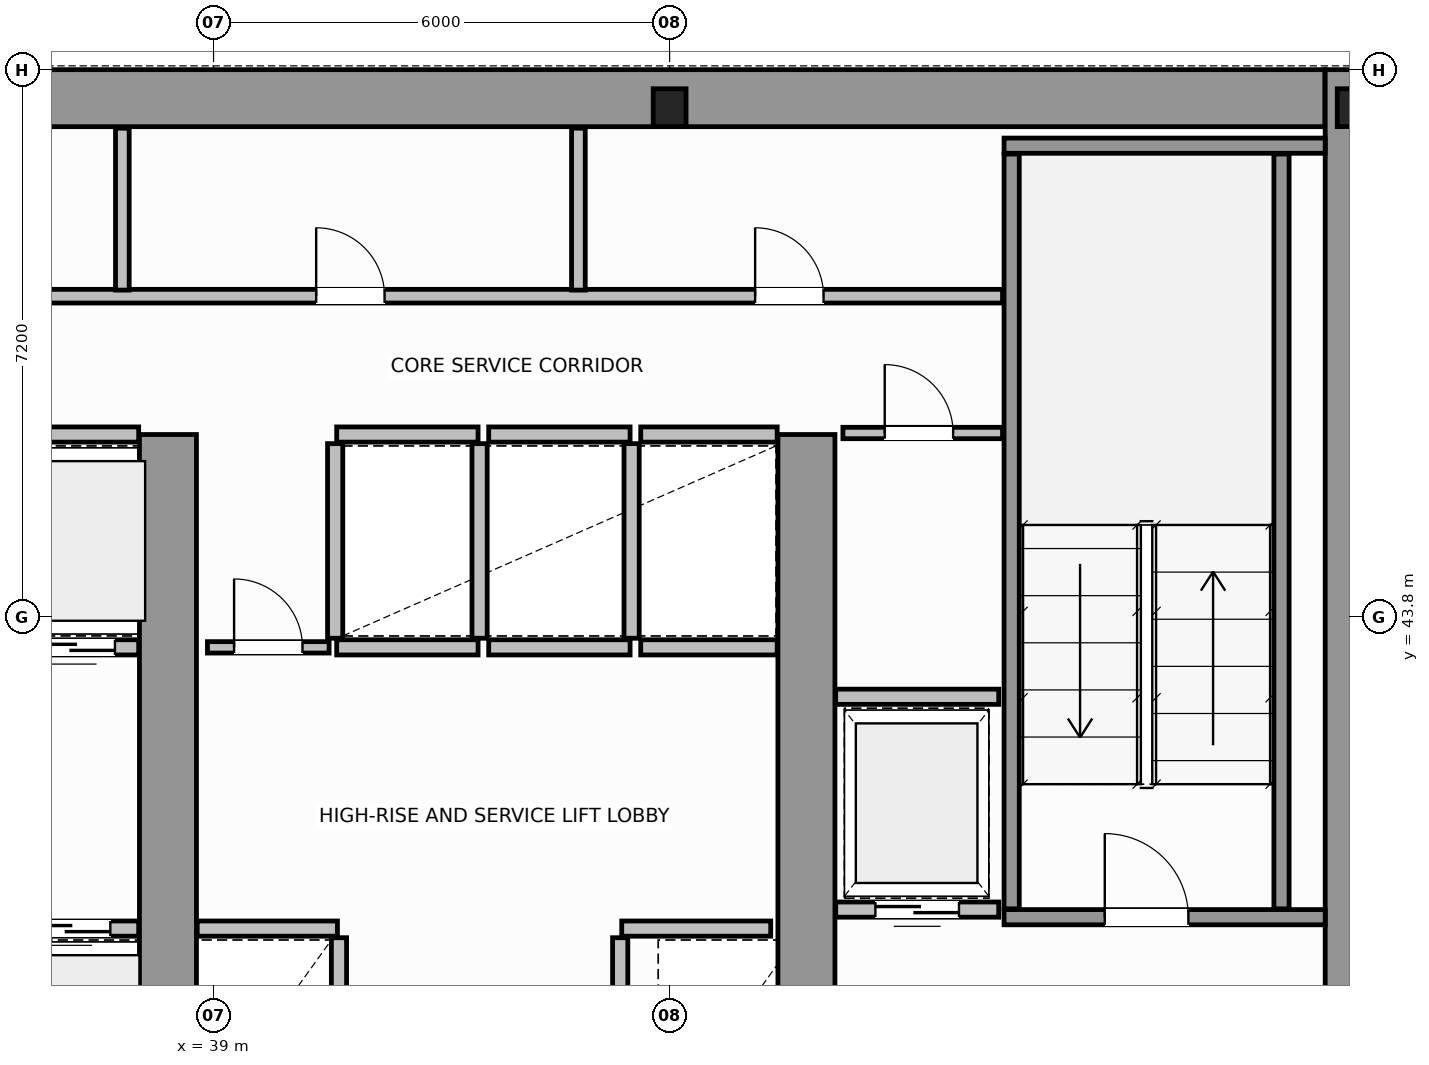
"""IFC4 building model, lengths in metres.
Left out: names, types, materials, properties, quantities, classifications, styles, units other than length and angle.
Written with IfcOpenShell. Run it as: python <this file> out.ifc"""

import sys

from ifc_helpers import new_model, si_unit, direction, frame, frame_2d, origin, origin_2d, place, context, subcontext, project, spatial, rectangle, i_section, extrude, source, transform, mapped, element, fill, save


model = new_model("IFC4")
c1 = context("Model", 3, precision=1e-05, world=origin(), true_north=direction((0.0, 1.0)))
c2 = subcontext(c1, "Body", "Model", "MODEL_VIEW")
j1 = project(units=[si_unit("LENGTHUNIT", "METRE"), si_unit("PLANEANGLEUNIT", "RADIAN")], contexts=[c1])
p1 = place(None, origin())
s1 = spatial("IfcSite", under=j1, at=p1, CompositionType="ELEMENT")
p2 = place(p1, origin())
s2 = spatial("IfcBuilding", under=s1, at=p2, CompositionType="ELEMENT")
p3 = place(p2, frame((0.0, 0.0, 157.6)))
s3 = spatial("IfcBuildingStorey", under=s2, at=p3, CompositionType="ELEMENT", Elevation=157.6)
m1 = source(origin(), c2, "Body", "SweptSolid", [
    extrude(i_section(OverallWidth=0.432, OverallDepth=0.498, WebThickness=0.055, FlangeThickness=0.068, FilletRadius=0.015, at=origin_2d()), origin(), (0.0, 0.0, 1.0), 3.8),
])
for number, where, z_axis, x_axis in (
    (1, (45.0, 50.5, 0.0), (0.0, 0.0, 1.0), (1.0, 0.0, 0.0)),
    (2, (54.0, 50.5, 0.0), (0.0, 0.0, 1.0), (1.0, 0.0, 0.0)),
):
    element("IfcColumn", number, at=place(p3, frame(where, z_axis=z_axis, x_axis=x_axis)), inside=s3, PredefinedType="COLUMN", context=c2, shape_type="MappedRepresentation", body=[
        mapped(m1, transform((0.0, 0.0, 0.0), scale=1.0)),
    ])
p4 = place(p3, frame((34.002, 50.625, 0.0), z_axis=(0.0, 0.0, 1.0), x_axis=(1.0, 0.0, 0.0)))
e3 = element("IfcWall", 3, at=p4, inside=s3, PredefinedType="SHEAR", context=c2, shape_type="SweptSolid", body=[
    extrude(rectangle(XDim=19.619, YDim=0.75, at=frame_2d((9.81, 0.0))), origin(), (0.0, 0.0, 1.0), 3.8),
])
p5 = place(p3, frame((54.0, 36.5, 0.0), z_axis=(0.0, 0.0, 1.0), x_axis=(0.0, 1.0, 0.0)))
e4 = element("IfcWall", 4, at=p5, inside=s3, PredefinedType="SHEAR", context=c2, shape_type="SweptSolid", body=[
    extrude(rectangle(XDim=14.5, YDim=0.75, at=frame_2d((7.25, 0.0))), origin(), (0.0, 0.0, 1.0), 3.8),
])
for number, where, z_axis, x_axis in (
    (5, (38.4, 36.895, 0.0), (0.0, 0.0, 1.0), (0.0, 1.0, 0.0)),
    (6, (46.8, 36.895, 0.0), (0.0, 0.0, 1.0), (0.0, 1.0, 0.0)),
):
    element("IfcWall", number, at=place(p3, frame(where, z_axis=z_axis, x_axis=x_axis)), inside=s3, PredefinedType="SHEAR", context=c2, shape_type="SweptSolid", body=[
        extrude(rectangle(XDim=9.305, YDim=0.75, at=frame_2d((4.652, 0.0))), origin(), (0.0, 0.0, 1.0), 3.8),
    ])
p6 = place(p3, frame((49.4, 39.85, 0.0), z_axis=(0.0, 0.0, 1.0), x_axis=(1.0, 0.0, 0.0)))
e7 = element("IfcWall", 7, at=p6, inside=s3, PredefinedType="SOLIDWALL", context=c2, shape_type="SweptSolid", body=[
    extrude(rectangle(XDim=4.225, YDim=0.2, at=frame_2d((2.113, 0.0))), origin(), (0.0, 0.0, 1.0), 3.8),
])
p7 = place(p6, frame((1.325, 0.0, 0.0)))
e8 = element("IfcOpeningElement", 8, at=p7, cuts=e7, PredefinedType="OPENING", context=c2, shape_type="SweptSolid", body=[
    extrude(rectangle(XDim=1.1, YDim=2.15, at=frame_2d((0.55, 1.075))), frame((0.0, 0.11, 0.0), z_axis=(0.0, -1.0, 0.0), x_axis=(1.0, 0.0, 0.0)), (0.0, 0.0, 1.0), 0.22),
])
p8 = place(p3, frame((49.4, 50.0, 0.0), z_axis=(0.0, 0.0, 1.0), x_axis=(1.0, 0.0, 0.0)))
e9 = element("IfcWall", 9, at=p8, inside=s3, PredefinedType="SOLIDWALL", context=c2, shape_type="SweptSolid", body=[
    extrude(rectangle(XDim=4.225, YDim=0.2, at=frame_2d((2.113, 0.0))), origin(), (0.0, 0.0, 1.0), 3.8),
])
for number, where, z_axis, x_axis in (
    (10, (49.5, 39.96, 0.0), (0.0, 0.0, 1.0), (0.0, 1.0, 0.0)),
    (11, (53.05, 39.96, 0.0), (0.0, 0.0, 1.0), (0.0, 1.0, 0.0)),
):
    element("IfcWall", number, at=place(p3, frame(where, z_axis=z_axis, x_axis=x_axis)), inside=s3, PredefinedType="SOLIDWALL", context=c2, shape_type="SweptSolid", body=[
        extrude(rectangle(XDim=9.93, YDim=0.2, at=frame_2d((4.965, 0.0))), origin(), (0.0, 0.0, 1.0), 3.8),
    ])
p9 = place(p3, frame((36.17, 39.7, 0.0), z_axis=(0.0, 0.0, 1.0), x_axis=(1.0, 0.0, 0.0)))
e12 = element("IfcWall", 12, at=p9, inside=s3, PredefinedType="SOLIDWALL", context=c2, shape_type="SweptSolid", body=[
    extrude(rectangle(XDim=1.845, YDim=0.2, at=frame_2d((0.922, 0.0))), origin(), (0.0, 0.0, 1.0), 3.58),
])
p10 = place(p9, frame((0.372, 0.0, 0.0)))
e13 = element("IfcOpeningElement", 13, at=p10, cuts=e12, PredefinedType="OPENING", context=c2, shape_type="SweptSolid", body=[
    extrude(rectangle(XDim=1.1, YDim=2.15, at=frame_2d((0.55, 1.075))), frame((0.0, 0.11, 0.0), z_axis=(0.0, -1.0, 0.0), x_axis=(1.0, 0.0, 0.0)), (0.0, 0.0, 1.0), 0.22),
])
p11 = place(p3, frame((36.29, 43.4, 0.0), z_axis=(0.0, 0.0, 1.0), x_axis=(1.0, 0.0, 0.0)))
e14 = element("IfcWall", 14, at=p11, inside=s3, PredefinedType="SOLIDWALL", context=c2, shape_type="SweptSolid", body=[
    extrude(rectangle(XDim=1.725, YDim=0.2, at=frame_2d((0.862, 0.0))), origin(), (0.0, 0.0, 1.0), 3.58),
])
p12 = place(p11, frame((0.313, 0.0, 0.0)))
e15 = element("IfcOpeningElement", 15, at=p12, cuts=e14, PredefinedType="OPENING", context=c2, shape_type="SweptSolid", body=[
    extrude(rectangle(XDim=1.1, YDim=2.15, at=frame_2d((0.55, 1.075))), frame((0.0, 0.11, 0.0), z_axis=(0.0, -1.0, 0.0), x_axis=(1.0, 0.0, 0.0)), (0.0, 0.0, 1.0), 0.22),
])
p13 = place(p3, frame((36.29, 46.2, 0.0), z_axis=(0.0, 0.0, 1.0), x_axis=(1.0, 0.0, 0.0)))
e16 = element("IfcWall", 16, at=p13, inside=s3, PredefinedType="SOLIDWALL", context=c2, shape_type="SweptSolid", body=[
    extrude(rectangle(XDim=1.725, YDim=0.2, at=frame_2d((0.862, 0.0))), origin(), (0.0, 0.0, 1.0), 3.58),
])
p14 = place(p3, frame((38.785, 39.7, 0.0), z_axis=(0.0, 0.0, 1.0), x_axis=(1.0, 0.0, 0.0)))
e17 = element("IfcWall", 17, at=p14, inside=s3, PredefinedType="SOLIDWALL", context=c2, shape_type="SweptSolid", body=[
    extrude(rectangle(XDim=1.845, YDim=0.2, at=frame_2d((0.922, 0.0))), origin(), (0.0, 0.0, 1.0), 3.58),
])
p15 = place(p3, frame((40.65, 37.02, 0.0), z_axis=(0.0, 0.0, 1.0), x_axis=(0.0, 1.0, 0.0)))
e18 = element("IfcWall", 18, at=p15, inside=s3, PredefinedType="SOLIDWALL", context=c2, shape_type="SweptSolid", body=[
    extrude(rectangle(XDim=2.56, YDim=0.2, at=frame_2d((1.28, 0.0))), origin(), (0.0, 0.0, 1.0), 3.58),
])
p16 = place(p3, frame((44.37, 39.7, 0.0), z_axis=(0.0, 0.0, 1.0), x_axis=(1.0, 0.0, 0.0)))
e19 = element("IfcWall", 19, at=p16, inside=s3, PredefinedType="SOLIDWALL", context=c2, shape_type="SweptSolid", body=[
    extrude(rectangle(XDim=1.96, YDim=0.2, at=frame_2d((0.98, 0.0))), origin(), (0.0, 0.0, 1.0), 3.58),
])
p17 = place(p3, frame((44.35, 37.02, 0.0), z_axis=(0.0, 0.0, 1.0), x_axis=(0.0, 1.0, 0.0)))
e20 = element("IfcWall", 20, at=p17, inside=s3, PredefinedType="SOLIDWALL", context=c2, shape_type="SweptSolid", body=[
    extrude(rectangle(XDim=2.56, YDim=0.2, at=frame_2d((1.28, 0.0))), origin(), (0.0, 0.0, 1.0), 3.58),
])
for number, where, z_axis, x_axis in (
    (21, (40.62, 43.4, 0.0), (0.0, 0.0, 1.0), (1.0, 0.0, 0.0)),
    (22, (40.62, 46.2, 0.0), (0.0, 0.0, 1.0), (1.0, 0.0, 0.0)),
):
    element("IfcWall", number, at=place(p3, frame(where, z_axis=z_axis, x_axis=x_axis)), inside=s3, PredefinedType="SOLIDWALL", context=c2, shape_type="SweptSolid", body=[
        extrude(rectangle(XDim=1.86, YDim=0.2, at=frame_2d((0.93, 0.0))), origin(), (0.0, 0.0, 1.0), 3.58),
    ])
for number, where, z_axis, x_axis in (
    (23, (40.6, 43.52, 0.0), (0.0, 0.0, 1.0), (0.0, 1.0, 0.0)),
    (24, (42.5, 43.52, 0.0), (0.0, 0.0, 1.0), (0.0, 1.0, 0.0)),
):
    element("IfcWall", number, at=place(p3, frame(where, z_axis=z_axis, x_axis=x_axis)), inside=s3, PredefinedType="SOLIDWALL", context=c2, shape_type="SweptSolid", body=[
        extrude(rectangle(XDim=2.56, YDim=0.2, at=frame_2d((1.28, 0.0))), origin(), (0.0, 0.0, 1.0), 3.58),
    ])
for number, where, z_axis, x_axis in (
    (25, (42.62, 43.4, 0.0), (0.0, 0.0, 1.0), (1.0, 0.0, 0.0)),
    (26, (42.62, 46.2, 0.0), (0.0, 0.0, 1.0), (1.0, 0.0, 0.0)),
):
    element("IfcWall", number, at=place(p3, frame(where, z_axis=z_axis, x_axis=x_axis)), inside=s3, PredefinedType="SOLIDWALL", context=c2, shape_type="SweptSolid", body=[
        extrude(rectangle(XDim=1.86, YDim=0.2, at=frame_2d((0.93, 0.0))), origin(), (0.0, 0.0, 1.0), 3.58),
    ])
p18 = place(p3, frame((44.5, 43.52, 0.0), z_axis=(0.0, 0.0, 1.0), x_axis=(0.0, 1.0, 0.0)))
e27 = element("IfcWall", 27, at=p18, inside=s3, PredefinedType="SOLIDWALL", context=c2, shape_type="SweptSolid", body=[
    extrude(rectangle(XDim=2.56, YDim=0.2, at=frame_2d((1.28, 0.0))), origin(), (0.0, 0.0, 1.0), 3.58),
])
for number, where, z_axis, x_axis in (
    (28, (44.62, 43.4, 0.0), (0.0, 0.0, 1.0), (1.0, 0.0, 0.0)),
    (29, (44.62, 46.2, 0.0), (0.0, 0.0, 1.0), (1.0, 0.0, 0.0)),
):
    element("IfcWall", number, at=place(p3, frame(where, z_axis=z_axis, x_axis=x_axis)), inside=s3, PredefinedType="SOLIDWALL", context=c2, shape_type="SweptSolid", body=[
        extrude(rectangle(XDim=1.795, YDim=0.2, at=frame_2d((0.897, 0.0))), origin(), (0.0, 0.0, 1.0), 3.58),
    ])
p19 = place(p3, frame((47.185, 39.95, 0.0), z_axis=(0.0, 0.0, 1.0), x_axis=(1.0, 0.0, 0.0)))
e30 = element("IfcWall", 30, at=p19, inside=s3, PredefinedType="SOLIDWALL", context=c2, shape_type="SweptSolid", body=[
    extrude(rectangle(XDim=2.145, YDim=0.2, at=frame_2d((1.073, 0.0))), origin(), (0.0, 0.0, 1.0), 3.58),
])
p20 = place(p19, frame((0.522, 0.0, 0.0)))
e31 = element("IfcOpeningElement", 31, at=p20, cuts=e30, PredefinedType="OPENING", context=c2, shape_type="SweptSolid", body=[
    extrude(rectangle(XDim=1.1, YDim=2.15, at=frame_2d((0.55, 1.075))), frame((0.0, 0.11, 0.0), z_axis=(0.0, -1.0, 0.0), x_axis=(1.0, 0.0, 0.0)), (0.0, 0.0, 1.0), 0.22),
])
p21 = place(p3, frame((47.185, 42.75, 0.0), z_axis=(0.0, 0.0, 1.0), x_axis=(1.0, 0.0, 0.0)))
e32 = element("IfcWall", 32, at=p21, inside=s3, PredefinedType="SOLIDWALL", context=c2, shape_type="SweptSolid", body=[
    extrude(rectangle(XDim=2.145, YDim=0.2, at=frame_2d((1.073, 0.0))), origin(), (0.0, 0.0, 1.0), 3.58),
])
p22 = place(p3, frame((47.28, 46.22, 0.0), z_axis=(0.0, 0.0, 1.0), x_axis=(1.0, 0.0, 0.0)))
e33 = element("IfcWall", 33, at=p22, inside=s3, PredefinedType="PARTITIONING", context=c2, shape_type="SweptSolid", body=[
    extrude(rectangle(XDim=2.1, YDim=0.15, at=frame_2d((1.05, 0.0))), origin(), (0.0, 0.0, 1.0), 3.58),
])
p23 = place(p22, frame((0.55, 0.0, 0.0)))
e34 = element("IfcOpeningElement", 34, at=p23, cuts=e33, PredefinedType="OPENING", context=c2, shape_type="SweptSolid", body=[
    extrude(rectangle(XDim=0.9, YDim=2.1, at=frame_2d((0.45, 1.05))), frame((0.0, 0.085, 0.0), z_axis=(0.0, -1.0, 0.0), x_axis=(1.0, 0.0, 0.0)), (0.0, 0.0, 1.0), 0.17),
])
p24 = place(p3, frame((38.92, 43.4, 0.0), z_axis=(0.0, 0.0, 1.0), x_axis=(1.0, 0.0, 0.0)))
e35 = element("IfcWall", 35, at=p24, inside=s3, PredefinedType="PARTITIONING", context=c2, shape_type="SweptSolid", body=[
    extrude(rectangle(XDim=1.6, YDim=0.15, at=frame_2d((0.8, 0.0))), origin(), (0.0, 0.0, 1.0), 3.58),
])
p25 = place(p24, frame((0.35, 0.0, 0.0)))
e36 = element("IfcOpeningElement", 36, at=p25, cuts=e35, PredefinedType="OPENING", context=c2, shape_type="SweptSolid", body=[
    extrude(rectangle(XDim=0.9, YDim=2.1, at=frame_2d((0.45, 1.05))), frame((0.0, 0.085, 0.0), z_axis=(0.0, -1.0, 0.0), x_axis=(1.0, 0.0, 0.0)), (0.0, 0.0, 1.0), 0.17),
])
p26 = place(p3, frame((18.62, 48.02, 0.0), z_axis=(0.0, 0.0, 1.0), x_axis=(1.0, 0.0, 0.0)))
e37 = element("IfcWall", 37, at=p26, inside=s3, PredefinedType="PLUMBINGWALL", context=c2, shape_type="SweptSolid", body=[
    extrude(rectangle(XDim=30.76, YDim=0.18, at=frame_2d((15.38, 0.0))), origin(), (0.0, 0.0, 1.0), 3.58),
])
p27 = place(p26, frame((1.655, 0.0, 0.0)))
e38 = element("IfcOpeningElement", 38, at=p27, cuts=e37, PredefinedType="OPENING", context=c2, shape_type="SweptSolid", body=[
    extrude(rectangle(XDim=0.9, YDim=2.15, at=frame_2d((0.45, 1.075))), frame((0.0, 0.1, 0.0), z_axis=(0.0, -1.0, 0.0), x_axis=(1.0, 0.0, 0.0)), (0.0, 0.0, 1.0), 0.2),
])
p28 = place(p26, frame((6.03, 0.0, 0.0)))
e39 = element("IfcOpeningElement", 39, at=p28, cuts=e37, PredefinedType="OPENING", context=c2, shape_type="SweptSolid", body=[
    extrude(rectangle(XDim=0.9, YDim=2.15, at=frame_2d((0.45, 1.075))), frame((0.0, 0.1, 0.0), z_axis=(0.0, -1.0, 0.0), x_axis=(1.0, 0.0, 0.0)), (0.0, 0.0, 1.0), 0.2),
])
p29 = place(p26, frame((10.93, 0.0, 0.0)))
e40 = element("IfcOpeningElement", 40, at=p29, cuts=e37, PredefinedType="OPENING", context=c2, shape_type="SweptSolid", body=[
    extrude(rectangle(XDim=0.9, YDim=2.15, at=frame_2d((0.45, 1.075))), frame((0.0, 0.1, 0.0), z_axis=(0.0, -1.0, 0.0), x_axis=(1.0, 0.0, 0.0)), (0.0, 0.0, 1.0), 0.2),
])
p30 = place(p26, frame((16.13, 0.0, 0.0)))
e41 = element("IfcOpeningElement", 41, at=p30, cuts=e37, PredefinedType="OPENING", context=c2, shape_type="SweptSolid", body=[
    extrude(rectangle(XDim=0.9, YDim=2.15, at=frame_2d((0.45, 1.075))), frame((0.0, 0.1, 0.0), z_axis=(0.0, -1.0, 0.0), x_axis=(1.0, 0.0, 0.0)), (0.0, 0.0, 1.0), 0.2),
])
p31 = place(p26, frame((21.73, 0.0, 0.0)))
e42 = element("IfcOpeningElement", 42, at=p31, cuts=e37, PredefinedType="OPENING", context=c2, shape_type="SweptSolid", body=[
    extrude(rectangle(XDim=0.9, YDim=2.15, at=frame_2d((0.45, 1.075))), frame((0.0, 0.1, 0.0), z_axis=(0.0, -1.0, 0.0), x_axis=(1.0, 0.0, 0.0)), (0.0, 0.0, 1.0), 0.2),
])
p32 = place(p26, frame((27.505, 0.0, 0.0)))
e43 = element("IfcOpeningElement", 43, at=p32, cuts=e37, PredefinedType="OPENING", context=c2, shape_type="SweptSolid", body=[
    extrude(rectangle(XDim=0.9, YDim=2.15, at=frame_2d((0.45, 1.075))), frame((0.0, 0.1, 0.0), z_axis=(0.0, -1.0, 0.0), x_axis=(1.0, 0.0, 0.0)), (0.0, 0.0, 1.0), 0.2),
])
for number, where, z_axis, x_axis in (
    (44, (37.8, 48.1, 0.0), (0.0, 0.0, 1.0), (0.0, 1.0, 0.0)),
    (45, (43.8, 48.1, 0.0), (0.0, 0.0, 1.0), (0.0, 1.0, 0.0)),
):
    element("IfcWall", number, at=place(p3, frame(where, z_axis=z_axis, x_axis=x_axis)), inside=s3, PredefinedType="PLUMBINGWALL", context=c2, shape_type="SweptSolid", body=[
        extrude(rectangle(XDim=2.13, YDim=0.18, at=frame_2d((1.065, 0.0))), origin(), (0.0, 0.0, 1.0), 3.58),
    ])
m2 = source(origin(), c2, "Body", "SweptSolid", [
    extrude(rectangle(XDim=1.1, YDim=2.15, at=frame_2d((0.55, 1.075))), frame((0.0, 0.025, 0.0), z_axis=(0.0, -1.0, 0.0), x_axis=(1.0, 0.0, 0.0)), (0.0, 0.0, 1.0), 0.05),
])
p33 = place(p7, origin())
e46 = element("IfcDoor", 46, at=p33, inside=s3, OperationType="SINGLE_SWING_RIGHT", PredefinedType="DOOR", context=c2, shape_type="MappedRepresentation", body=[
    mapped(m2, transform((0.0, 0.0, 0.0), scale=1.0)),
])
fill(e8, e46)
p34 = place(p10, origin())
e47 = element("IfcDoor", 47, at=p34, inside=s3, OperationType="DOUBLE_DOOR_SLIDING", PredefinedType="DOOR", context=c2, shape_type="MappedRepresentation", body=[
    mapped(m2, transform((0.0, 0.0, 0.0), scale=1.0)),
])
fill(e13, e47)
p35 = place(p12, origin())
e48 = element("IfcDoor", 48, at=p35, inside=s3, OperationType="DOUBLE_DOOR_SLIDING", PredefinedType="DOOR", context=c2, shape_type="MappedRepresentation", body=[
    mapped(m2, transform((0.0, 0.0, 0.0), scale=1.0)),
])
fill(e15, e48)
p36 = place(p20, origin())
e49 = element("IfcDoor", 49, at=p36, inside=s3, OperationType="DOUBLE_DOOR_SLIDING", PredefinedType="DOOR", context=c2, shape_type="MappedRepresentation", body=[
    mapped(m2, transform((0.0, 0.0, 0.0), scale=1.0)),
])
fill(e31, e49)
m3 = source(origin(), c2, "Body", "SweptSolid", [
    extrude(rectangle(XDim=0.9, YDim=2.1, at=frame_2d((0.45, 1.05))), frame((0.0, 0.025, 0.0), z_axis=(0.0, -1.0, 0.0), x_axis=(1.0, 0.0, 0.0)), (0.0, 0.0, 1.0), 0.05),
])
p37 = place(p23, origin())
e50 = element("IfcDoor", 50, at=p37, inside=s3, OperationType="SINGLE_SWING_RIGHT", PredefinedType="DOOR", context=c2, shape_type="MappedRepresentation", body=[
    mapped(m3, transform((0.0, 0.0, 0.0), scale=1.0)),
])
fill(e34, e50)
p38 = place(p25, origin())
e51 = element("IfcDoor", 51, at=p38, inside=s3, OperationType="SINGLE_SWING_LEFT", PredefinedType="DOOR", context=c2, shape_type="MappedRepresentation", body=[
    mapped(m3, transform((0.0, 0.0, 0.0), scale=1.0)),
])
fill(e36, e51)
m4 = source(origin(), c2, "Body", "SweptSolid", [
    extrude(rectangle(XDim=0.9, YDim=2.15, at=frame_2d((0.45, 1.075))), frame((0.0, 0.025, 0.0), z_axis=(0.0, -1.0, 0.0), x_axis=(1.0, 0.0, 0.0)), (0.0, 0.0, 1.0), 0.05),
])
p39 = place(p31, origin())
e52 = element("IfcDoor", 52, at=p39, inside=s3, OperationType="SINGLE_SWING_LEFT", PredefinedType="DOOR", context=c2, shape_type="MappedRepresentation", body=[
    mapped(m4, transform((0.0, 0.0, 0.0), scale=1.0)),
])
fill(e42, e52)
p40 = place(p32, origin())
e53 = element("IfcDoor", 53, at=p40, inside=s3, OperationType="SINGLE_SWING_RIGHT", PredefinedType="DOOR", context=c2, shape_type="MappedRepresentation", body=[
    mapped(m4, transform((0.0, 0.0, 0.0), scale=1.0)),
])
fill(e43, e53)
save(model, sys.argv[1])
